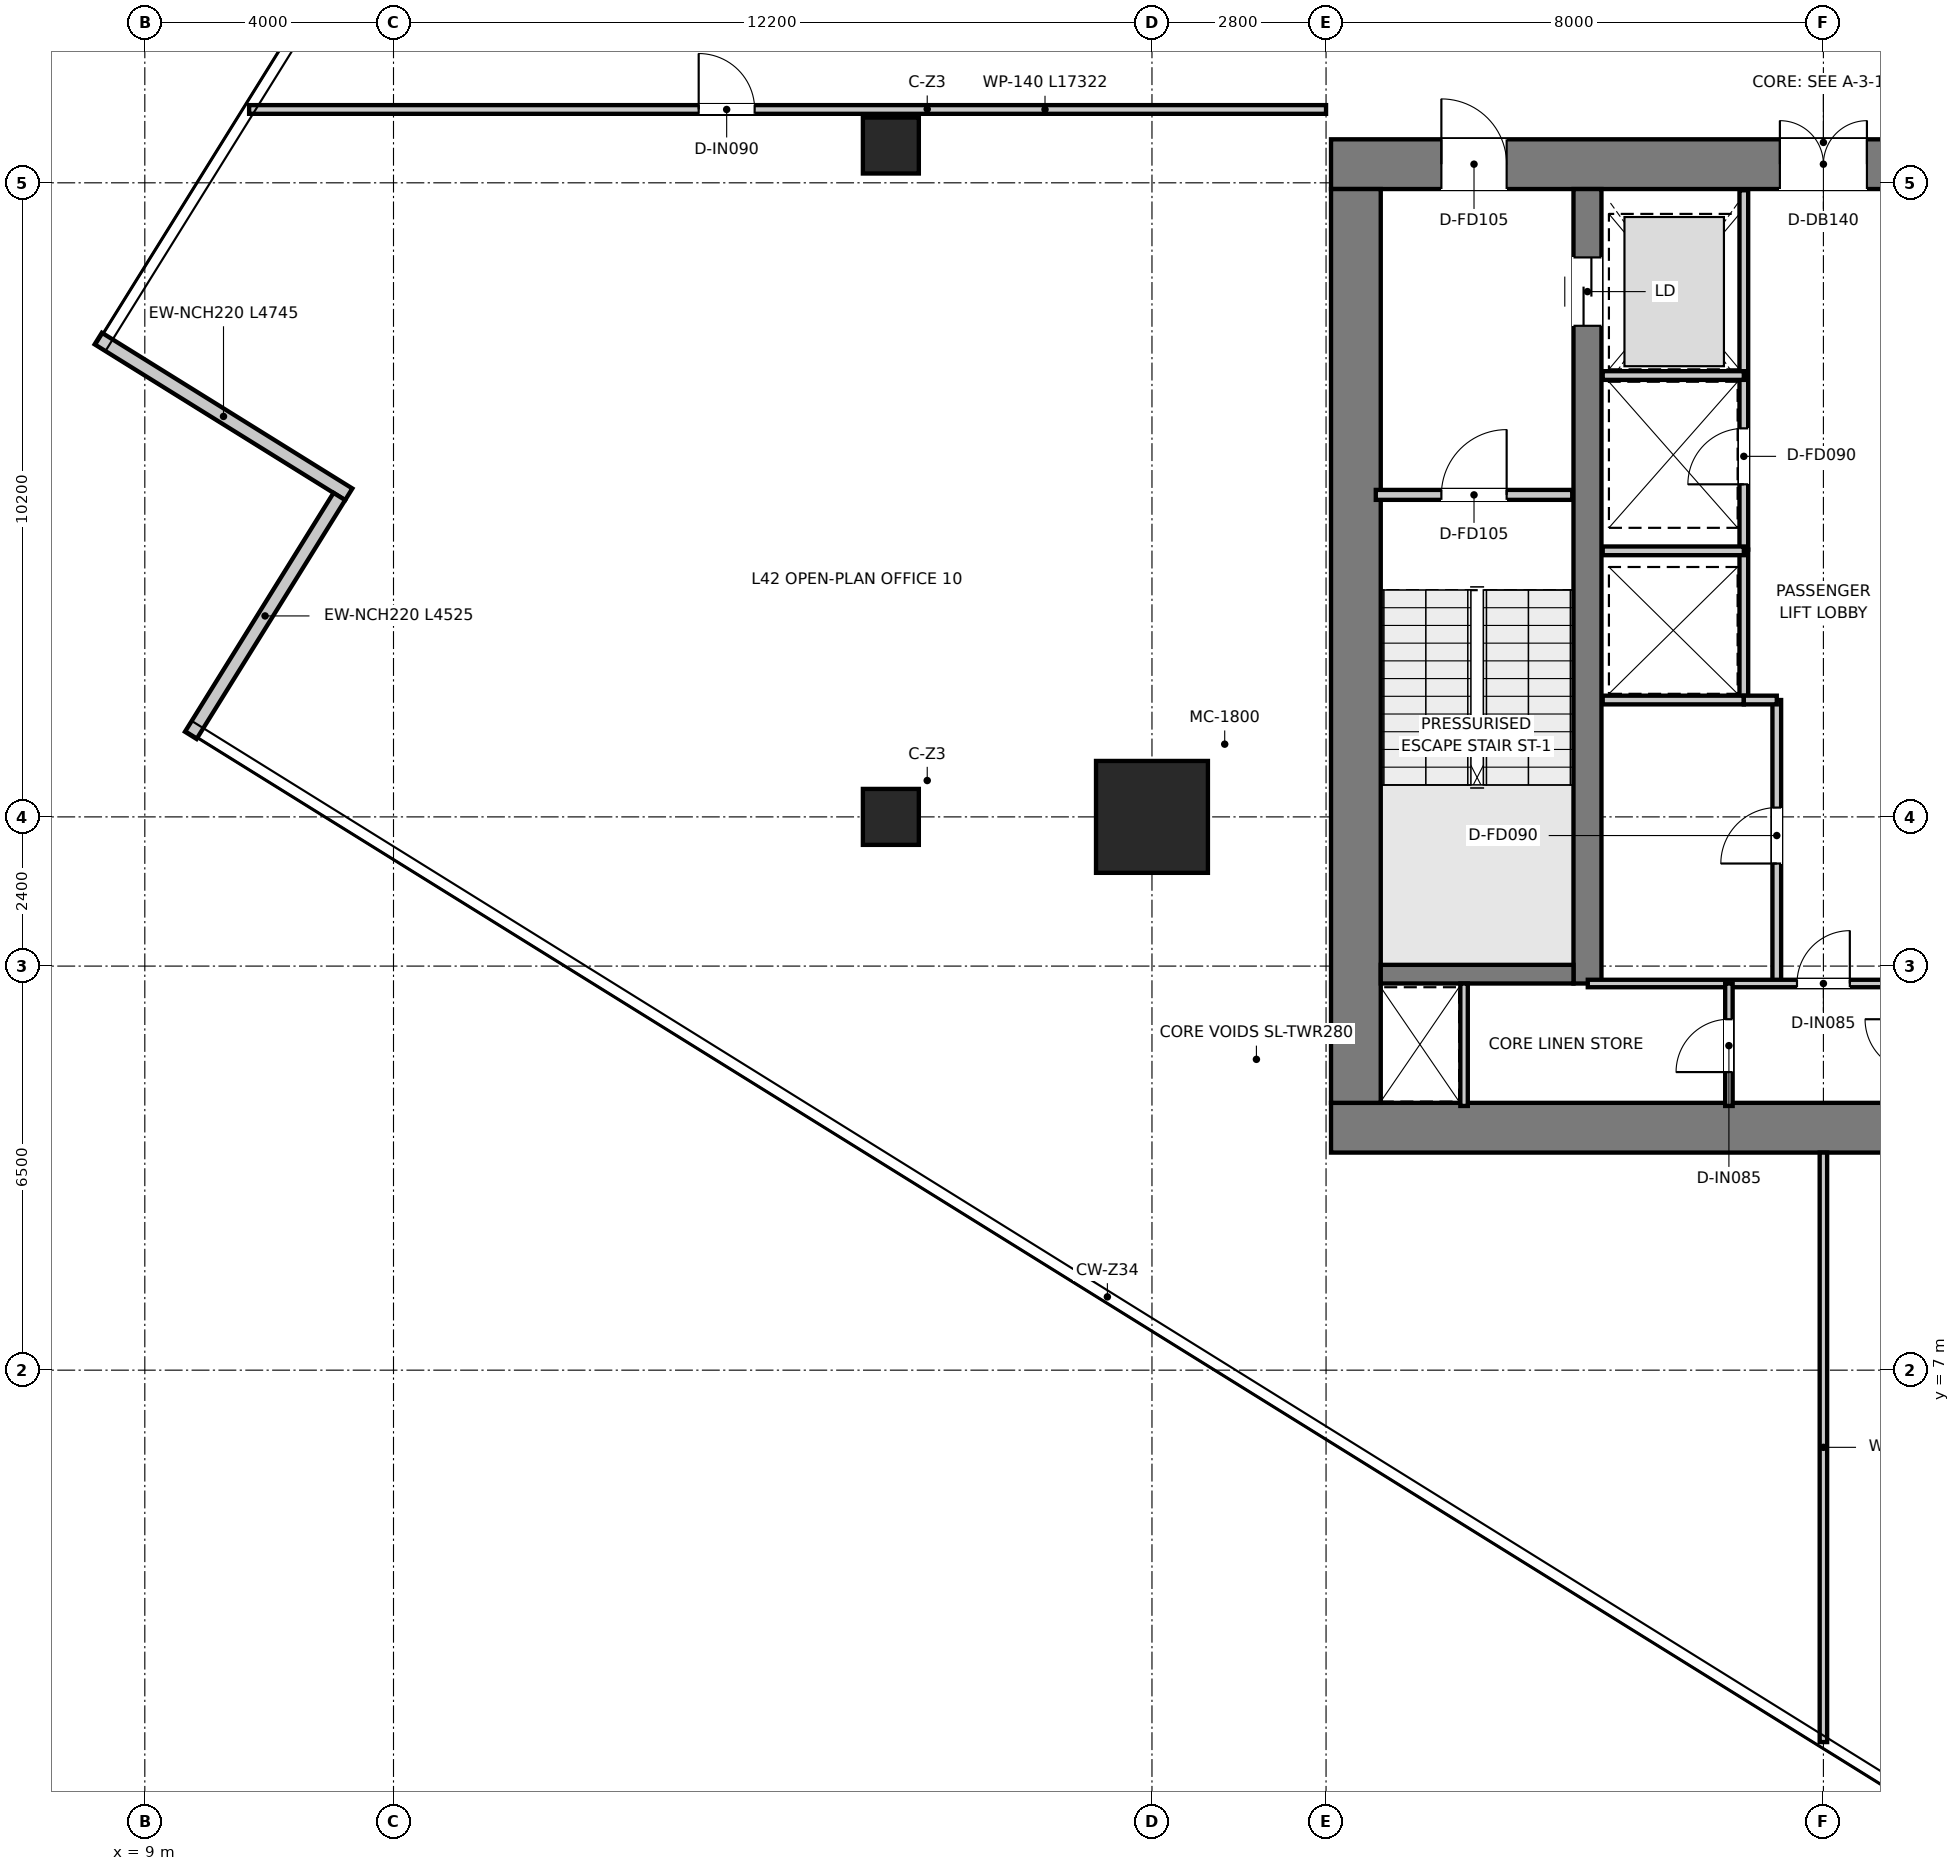
"""IFC4 building model, lengths in metres.
Left out: names, types, materials, properties, quantities, classifications, styles, units other than length and angle.
Written with IfcOpenShell. Run it as: python <this file> out.ifc"""

import sys

from ifc_helpers import new_model, si_unit, direction, frame, frame_2d, origin, origin_2d, place, context, subcontext, project, spatial, rectangle, extrude, source, transform, mapped, element, fill, save


model = new_model("IFC4")
c1 = context("Model", 3, precision=1e-05, world=origin(), true_north=direction((0.0, 1.0)))
c2 = subcontext(c1, "Body", "Model", "MODEL_VIEW")
j1 = project(units=[si_unit("LENGTHUNIT", "METRE"), si_unit("PLANEANGLEUNIT", "RADIAN")], contexts=[c1])
p1 = place(None, origin())
s1 = spatial("IfcSite", under=j1, at=p1, CompositionType="ELEMENT")
p2 = place(p1, origin())
s2 = spatial("IfcBuilding", under=s1, at=p2, CompositionType="ELEMENT")
p3 = place(p2, frame((0.0, 0.0, 173.85)))
s3 = spatial("IfcBuildingStorey", under=s2, at=p3, CompositionType="ELEMENT", Elevation=173.85)
p4 = place(p3, frame((28.08, 10.9, 0.0), z_axis=(0.0, 0.0, 1.0), x_axis=(1.0, 0.0, 0.0)))
e1 = element("IfcWall", 1, at=p4, inside=s3, PredefinedType="SHEAR", context=c2, shape_type="SweptSolid", body=[
    extrude(rectangle(XDim=15.84, YDim=0.8, at=frame_2d((7.92, 0.0))), origin(), (0.0, 0.0, 1.0), 3.95),
])
p5 = place(p3, frame((28.08, 26.4, 0.0), z_axis=(0.0, 0.0, 1.0), x_axis=(1.0, 0.0, 0.0)))
e2 = element("IfcWall", 2, at=p5, inside=s3, PredefinedType="SHEAR", context=c2, shape_type="SweptSolid", body=[
    extrude(rectangle(XDim=15.84, YDim=0.8, at=frame_2d((7.92, 0.0))), origin(), (0.0, 0.0, 1.0), 3.95),
])
p6 = place(p5, frame((7.22, 0.0, 0.0)))
e3 = element("IfcOpeningElement", 3, at=p6, cuts=e2, PredefinedType="OPENING", context=c2, shape_type="SweptSolid", body=[
    extrude(rectangle(XDim=1.4, YDim=2.2, at=frame_2d((0.7, 1.1))), frame((0.0, 0.41, 0.0), z_axis=(0.0, -1.0, 0.0), x_axis=(1.0, 0.0, 0.0)), (0.0, 0.0, 1.0), 0.82),
])
p7 = place(p5, frame((1.775, 0.0, 0.0)))
e4 = element("IfcOpeningElement", 4, at=p7, cuts=e2, PredefinedType="OPENING", context=c2, shape_type="SweptSolid", body=[
    extrude(rectangle(XDim=1.05, YDim=2.1, at=frame_2d((0.525, 1.05))), frame((0.0, 0.41, 0.0), z_axis=(0.0, -1.0, 0.0), x_axis=(1.0, 0.0, 0.0)), (0.0, 0.0, 1.0), 0.82),
])
p8 = place(p5, frame((13.015, 0.0, 0.0)))
e5 = element("IfcOpeningElement", 5, at=p8, cuts=e2, PredefinedType="OPENING", context=c2, shape_type="SweptSolid", body=[
    extrude(rectangle(XDim=1.05, YDim=2.1, at=frame_2d((0.525, 1.05))), frame((0.0, 0.41, 0.0), z_axis=(0.0, -1.0, 0.0), x_axis=(1.0, 0.0, 0.0)), (0.0, 0.0, 1.0), 0.82),
])
p9 = place(p3, frame((28.48, 11.3, 0.0), z_axis=(0.0, 0.0, 1.0), x_axis=(0.0, 1.0, 0.0)))
e6 = element("IfcWall", 6, at=p9, inside=s3, PredefinedType="SHEAR", context=c2, shape_type="SweptSolid", body=[
    extrude(rectangle(XDim=14.7, YDim=0.8, at=frame_2d((7.35, 0.0))), origin(), (0.0, 0.0, 1.0), 3.95),
])
p10 = place(p3, frame((32.205, 13.22, 0.0), z_axis=(0.0, 0.0, 1.0), x_axis=(0.0, 1.0, 0.0)))
e7 = element("IfcWall", 7, at=p10, inside=s3, PredefinedType="SHEAR", context=c2, shape_type="SweptSolid", body=[
    extrude(rectangle(XDim=12.78, YDim=0.45, at=frame_2d((6.39, 0.0))), origin(), (0.0, 0.0, 1.0), 3.95),
])
p11 = place(p10, frame((10.58, 0.0, 0.0)))
e8 = element("IfcOpeningElement", 8, at=p11, cuts=e7, PredefinedType="OPENING", context=c2, shape_type="SweptSolid", body=[
    extrude(rectangle(XDim=1.1, YDim=2.15, at=frame_2d((0.55, 1.075))), frame((0.0, 0.235, 0.0), z_axis=(0.0, -1.0, 0.0), x_axis=(1.0, 0.0, 0.0)), (0.0, 0.0, 1.0), 0.47),
])
p12 = place(p3, frame((28.88, 13.37, 0.0), z_axis=(0.0, 0.0, 1.0), x_axis=(1.0, 0.0, 0.0)))
e9 = element("IfcWall", 9, at=p12, inside=s3, PredefinedType="SHEAR", context=c2, shape_type="SweptSolid", body=[
    extrude(rectangle(XDim=3.1, YDim=0.3, at=frame_2d((1.55, 0.0))), origin(), (0.0, 0.0, 1.0), 3.95),
])
m1 = source(origin(), c2, "Body", "SweptSolid", [
    extrude(rectangle(XDim=1.8, YDim=1.8, at=origin_2d()), origin(), (0.0, 0.0, 1.0), 3.95),
])
p13 = place(p3, frame((25.2, 15.9, 0.0), z_axis=(0.0, 0.0, 1.0), x_axis=(1.0, 0.0, 0.0)))
e10 = element("IfcColumn", 10, at=p13, inside=s3, PredefinedType="USERDEFINED", context=c2, shape_type="MappedRepresentation", body=[
    mapped(m1, transform((0.0, 0.0, 0.0), x_axis=(1.0, 0.0, 0.0), y_axis=(0.0, 1.0, 0.0), z_axis=(0.0, 0.0, 1.0), scale=1.0)),
])
m2 = source(origin(), c2, "Body", "SweptSolid", [
    extrude(rectangle(XDim=0.9, YDim=0.9, at=origin_2d()), origin(), (0.0, 0.0, 1.0), 3.95),
])
for number, where, z_axis, x_axis in (
    (11, (21.0, 15.9, 0.0), (0.0, 0.0, 1.0), (1.0, 0.0, 0.0)),
    (12, (21.0, 26.7, 0.0), (0.0, 0.0, 1.0), (1.0, 0.0, 0.0)),
):
    element("IfcColumn", number, at=place(p3, frame(where, z_axis=z_axis, x_axis=x_axis)), inside=s3, PredefinedType="COLUMN", context=c2, shape_type="MappedRepresentation", body=[
        mapped(m2, transform((0.0, 0.0, 0.0), x_axis=(1.0, 0.0, 0.0), y_axis=(0.0, 1.0, 0.0), z_axis=(0.0, 0.0, 1.0), scale=1.0)),
    ])
p14 = place(p3, frame((8.251, 23.595, 0.0), z_axis=(0.0, 0.0, 1.0), x_axis=(0.84921299194, -0.528050465694, 0.0)))
e13 = element("IfcWall", 13, at=p14, inside=s3, PredefinedType="ELEMENTEDWALL", context=c2, shape_type="SweptSolid", body=[
    extrude(rectangle(XDim=4.745, YDim=0.22, at=frame_2d((2.373, 0.0))), origin(), (0.0, 0.0, 1.0), 3.67),
])
p15 = place(p3, frame((12.129, 21.054, 0.0), z_axis=(0.0, 0.0, 1.0), x_axis=(-0.528038242514, -0.849220592333, 0.0)))
e14 = element("IfcWall", 14, at=p15, inside=s3, PredefinedType="ELEMENTEDWALL", context=c2, shape_type="SweptSolid", body=[
    extrude(rectangle(XDim=4.525, YDim=0.22, at=frame_2d((2.263, 0.0))), origin(), (0.0, 0.0, 1.0), 3.67),
])
p16 = place(p3, frame((28.8, 21.08, 0.0), z_axis=(0.0, 0.0, 1.0), x_axis=(1.0, 0.0, 0.0)))
e15 = element("IfcWall", 15, at=p16, inside=s3, PredefinedType="PARTITIONING", context=c2, shape_type="SweptSolid", body=[
    extrude(rectangle(XDim=3.16, YDim=0.16, at=frame_2d((1.58, 0.0))), origin(), (0.0, 0.0, 1.0), 3.67),
])
p17 = place(p16, frame((1.055, 0.0, 0.0)))
e16 = element("IfcOpeningElement", 16, at=p17, cuts=e15, PredefinedType="OPENING", context=c2, shape_type="SweptSolid", body=[
    extrude(rectangle(XDim=1.05, YDim=2.1, at=frame_2d((0.525, 1.05))), frame((0.0, 0.09, 0.0), z_axis=(0.0, -1.0, 0.0), x_axis=(1.0, 0.0, 0.0)), (0.0, 0.0, 1.0), 0.18),
])
p18 = place(p3, frame((34.72, 20.2, 0.0), z_axis=(0.0, 0.0, 1.0), x_axis=(0.0, 1.0, 0.0)))
e17 = element("IfcWall", 17, at=p18, inside=s3, PredefinedType="PARTITIONING", context=c2, shape_type="SweptSolid", body=[
    extrude(rectangle(XDim=5.78, YDim=0.14, at=frame_2d((2.89, 0.0))), origin(), (0.0, 0.0, 1.0), 2.67),
])
p19 = place(p18, frame((1.05, 0.0, 0.0)))
e18 = element("IfcOpeningElement", 18, at=p19, cuts=e17, PredefinedType="OPENING", context=c2, shape_type="SweptSolid", body=[
    extrude(rectangle(XDim=0.9, YDim=2.1, at=frame_2d((0.45, 1.05))), frame((0.0, 0.08, 0.0), z_axis=(0.0, -1.0, 0.0), x_axis=(1.0, 0.0, 0.0)), (0.0, 0.0, 1.0), 0.16),
])
p20 = place(p3, frame((32.45, 23.0, 0.0), z_axis=(0.0, 0.0, 1.0), x_axis=(1.0, 0.0, 0.0)))
e19 = element("IfcWall", 19, at=p20, inside=s3, PredefinedType="PARTITIONING", context=c2, shape_type="SweptSolid", body=[
    extrude(rectangle(XDim=2.27, YDim=0.14, at=frame_2d((1.135, 0.0))), origin(), (0.0, 0.0, 1.0), 2.67),
])
p21 = place(p3, frame((34.72, 17.78, 0.0), z_axis=(0.0, 0.0, 1.0), x_axis=(0.0, 1.0, 0.0)))
e20 = element("IfcWall", 20, at=p21, inside=s3, PredefinedType="PARTITIONING", context=c2, shape_type="SweptSolid", body=[
    extrude(rectangle(XDim=2.42, YDim=0.14, at=frame_2d((1.21, 0.0))), origin(), (0.0, 0.0, 1.0), 3.67),
])
for number, where, z_axis, x_axis in (
    (21, (32.45, 17.78, 0.0), (0.0, 0.0, 1.0), (1.0, 0.0, 0.0)),
    (22, (32.45, 20.18, 0.0), (0.0, 0.0, 1.0), (1.0, 0.0, 0.0)),
):
    element("IfcWall", number, at=place(p3, frame(where, z_axis=z_axis, x_axis=x_axis)), inside=s3, PredefinedType="PARTITIONING", context=c2, shape_type="SweptSolid", body=[
        extrude(rectangle(XDim=2.27, YDim=0.14, at=frame_2d((1.135, 0.0))), origin(), (0.0, 0.0, 1.0), 3.67),
    ])
p22 = place(p3, frame((35.25, 13.22, 0.0), z_axis=(0.0, 0.0, 1.0), x_axis=(0.0, 1.0, 0.0)))
e23 = element("IfcWall", 23, at=p22, inside=s3, PredefinedType="PARTITIONING", context=c2, shape_type="SweptSolid", body=[
    extrude(rectangle(XDim=4.56, YDim=0.14, at=frame_2d((2.28, 0.0))), origin(), (0.0, 0.0, 1.0), 3.67),
])
p23 = place(p22, frame((1.93, 0.0, 0.0)))
e24 = element("IfcOpeningElement", 24, at=p23, cuts=e23, PredefinedType="OPENING", context=c2, shape_type="SweptSolid", body=[
    extrude(rectangle(XDim=0.9, YDim=2.1, at=frame_2d((0.45, 1.05))), frame((0.0, 0.08, 0.0), z_axis=(0.0, -1.0, 0.0), x_axis=(1.0, 0.0, 0.0)), (0.0, 0.0, 1.0), 0.16),
])
p24 = place(p3, frame((34.72, 17.78, 0.0), z_axis=(0.0, 0.0, 1.0), x_axis=(1.0, 0.0, 0.0)))
e25 = element("IfcWall", 25, at=p24, inside=s3, PredefinedType="PARTITIONING", context=c2, shape_type="SweptSolid", body=[
    extrude(rectangle(XDim=0.53, YDim=0.14, at=frame_2d((0.265, 0.0))), origin(), (0.0, 0.0, 1.0), 3.67),
])
p25 = place(p3, frame((30.22, 11.25, 0.0), z_axis=(0.0, 0.0, 1.0), x_axis=(0.0, 1.0, 0.0)))
e26 = element("IfcWall", 26, at=p25, inside=s3, PredefinedType="PARTITIONING", context=c2, shape_type="SweptSolid", body=[
    extrude(rectangle(XDim=1.97, YDim=0.12, at=frame_2d((0.985, 0.0))), origin(), (0.0, 0.0, 1.0), 3.67),
])
p26 = place(p3, frame((32.21, 13.22, 0.0), z_axis=(0.0, 0.0, 1.0), x_axis=(1.0, 0.0, 0.0)))
e27 = element("IfcWall", 27, at=p26, inside=s3, PredefinedType="PARTITIONING", context=c2, shape_type="SweptSolid", body=[
    extrude(rectangle(XDim=7.58, YDim=0.12, at=frame_2d((3.79, 0.0))), origin(), (0.0, 0.0, 1.0), 3.67),
])
p27 = place(p26, frame((3.365, 0.0, 0.0)))
e28 = element("IfcOpeningElement", 28, at=p27, cuts=e27, PredefinedType="OPENING", context=c2, shape_type="SweptSolid", body=[
    extrude(rectangle(XDim=0.85, YDim=2.1, at=frame_2d((0.425, 1.05))), frame((0.0, 0.07, 0.0), z_axis=(0.0, -1.0, 0.0), x_axis=(1.0, 0.0, 0.0)), (0.0, 0.0, 1.0), 0.14),
])
p28 = place(p3, frame((34.48, 11.25, 0.0), z_axis=(0.0, 0.0, 1.0), x_axis=(0.0, 1.0, 0.0)))
e29 = element("IfcWall", 29, at=p28, inside=s3, PredefinedType="PARTITIONING", context=c2, shape_type="SweptSolid", body=[
    extrude(rectangle(XDim=1.97, YDim=0.12, at=frame_2d((0.985, 0.0))), origin(), (0.0, 0.0, 1.0), 3.67),
])
p29 = place(p28, frame((0.545, 0.0, 0.0)))
e30 = element("IfcOpeningElement", 30, at=p29, cuts=e29, PredefinedType="OPENING", context=c2, shape_type="SweptSolid", body=[
    extrude(rectangle(XDim=0.85, YDim=2.1, at=frame_2d((0.425, 1.05))), frame((0.0, 0.07, 0.0), z_axis=(0.0, -1.0, 0.0), x_axis=(1.0, 0.0, 0.0)), (0.0, 0.0, 1.0), 0.14),
])
p30 = place(p3, frame((10.678, 27.28, 0.0), z_axis=(0.0, 0.0, 1.0), x_axis=(1.0, 0.0, 0.0)))
e31 = element("IfcWall", 31, at=p30, inside=s3, PredefinedType="PARTITIONING", context=c2, shape_type="SweptSolid", body=[
    extrude(rectangle(XDim=17.322, YDim=0.14, at=frame_2d((8.661, 0.0))), origin(), (0.0, 0.0, 1.0), 3.03),
])
p31 = place(p30, frame((7.231, 0.0, 0.0)))
e32 = element("IfcOpeningElement", 32, at=p31, cuts=e31, PredefinedType="OPENING", context=c2, shape_type="SweptSolid", body=[
    extrude(rectangle(XDim=0.9, YDim=2.1, at=frame_2d((0.45, 1.05))), frame((0.0, 0.08, 0.0), z_axis=(0.0, -1.0, 0.0), x_axis=(1.0, 0.0, 0.0)), (0.0, 0.0, 1.0), 0.16),
])
p32 = place(p3, frame((36.0, 1.017, 0.0), z_axis=(0.0, 0.0, 1.0), x_axis=(0.0, 1.0, 0.0)))
e33 = element("IfcWall", 33, at=p32, inside=s3, PredefinedType="PARTITIONING", context=c2, shape_type="SweptSolid", body=[
    extrude(rectangle(XDim=9.483, YDim=0.12, at=frame_2d((4.741, 0.0))), origin(), (0.0, 0.0, 1.0), 3.67),
])
p33 = place(p17, origin())
e34 = element("IfcDoor", 34, at=p33, inside=s3, OperationType="SINGLE_SWING_RIGHT", PredefinedType="DOOR", context=c2, shape_type="SweptSolid", body=[
    extrude(rectangle(XDim=1.05, YDim=2.1, at=frame_2d((0.525, 1.05))), frame((0.0, 0.025, 0.0), z_axis=(0.0, -1.0, 0.0), x_axis=(1.0, 0.0, 0.0)), (0.0, 0.0, 1.0), 0.05),
])
fill(e16, e34)
p34 = place(p6, origin())
e35 = element("IfcDoor", 35, at=p34, inside=s3, OperationType="DOUBLE_DOOR_SINGLE_SWING", PredefinedType="DOOR", context=c2, shape_type="SweptSolid", body=[
    extrude(rectangle(XDim=1.4, YDim=2.2, at=frame_2d((0.7, 1.1))), frame((0.0, 0.025, 0.0), z_axis=(0.0, -1.0, 0.0), x_axis=(1.0, 0.0, 0.0)), (0.0, 0.0, 1.0), 0.05),
])
fill(e3, e35)
p35 = place(p7, origin())
e36 = element("IfcDoor", 36, at=p35, inside=s3, OperationType="SINGLE_SWING_LEFT", PredefinedType="DOOR", context=c2, shape_type="SweptSolid", body=[
    extrude(rectangle(XDim=1.05, YDim=2.1, at=frame_2d((0.525, 1.05))), frame((0.0, 0.025, 0.0), z_axis=(0.0, -1.0, 0.0), x_axis=(1.0, 0.0, 0.0)), (0.0, 0.0, 1.0), 0.05),
])
fill(e4, e36)
p36 = place(p11, origin())
e37 = element("IfcDoor", 37, at=p36, inside=s3, OperationType="DOUBLE_DOOR_SLIDING", PredefinedType="DOOR", context=c2, shape_type="SweptSolid", body=[
    extrude(rectangle(XDim=1.1, YDim=2.15, at=frame_2d((0.55, 1.075))), frame((0.0, 0.025, 0.0), z_axis=(0.0, -1.0, 0.0), x_axis=(1.0, 0.0, 0.0)), (0.0, 0.0, 1.0), 0.05),
])
fill(e8, e37)
p37 = place(p19, origin())
e38 = element("IfcDoor", 38, at=p37, inside=s3, OperationType="SINGLE_SWING_LEFT", PredefinedType="DOOR", context=c2, shape_type="SweptSolid", body=[
    extrude(rectangle(XDim=0.9, YDim=2.1, at=frame_2d((0.45, 1.05))), frame((0.0, 0.025, 0.0), z_axis=(0.0, -1.0, 0.0), x_axis=(1.0, 0.0, 0.0)), (0.0, 0.0, 1.0), 0.05),
])
fill(e18, e38)
p38 = place(p23, origin())
e39 = element("IfcDoor", 39, at=p38, inside=s3, OperationType="SINGLE_SWING_LEFT", PredefinedType="DOOR", context=c2, shape_type="SweptSolid", body=[
    extrude(rectangle(XDim=0.9, YDim=2.1, at=frame_2d((0.45, 1.05))), frame((0.0, 0.025, 0.0), z_axis=(0.0, -1.0, 0.0), x_axis=(1.0, 0.0, 0.0)), (0.0, 0.0, 1.0), 0.05),
])
fill(e24, e39)
p39 = place(p27, origin())
e40 = element("IfcDoor", 40, at=p39, inside=s3, OperationType="SINGLE_SWING_RIGHT", PredefinedType="DOOR", context=c2, shape_type="SweptSolid", body=[
    extrude(rectangle(XDim=0.85, YDim=2.1, at=frame_2d((0.425, 1.05))), frame((0.0, 0.025, 0.0), z_axis=(0.0, -1.0, 0.0), x_axis=(1.0, 0.0, 0.0)), (0.0, 0.0, 1.0), 0.05),
])
fill(e28, e40)
p40 = place(p29, origin())
e41 = element("IfcDoor", 41, at=p40, inside=s3, OperationType="SINGLE_SWING_LEFT", PredefinedType="DOOR", context=c2, shape_type="SweptSolid", body=[
    extrude(rectangle(XDim=0.85, YDim=2.1, at=frame_2d((0.425, 1.05))), frame((0.0, 0.025, 0.0), z_axis=(0.0, -1.0, 0.0), x_axis=(1.0, 0.0, 0.0)), (0.0, 0.0, 1.0), 0.05),
])
fill(e30, e41)
p41 = place(p31, origin())
e42 = element("IfcDoor", 42, at=p41, inside=s3, OperationType="SINGLE_SWING_LEFT", PredefinedType="DOOR", context=c2, shape_type="SweptSolid", body=[
    extrude(rectangle(XDim=0.9, YDim=2.1, at=frame_2d((0.45, 1.05))), frame((0.0, 0.025, 0.0), z_axis=(0.0, -1.0, 0.0), x_axis=(1.0, 0.0, 0.0)), (0.0, 0.0, 1.0), 0.05),
])
fill(e32, e42)
save(model, sys.argv[1])
